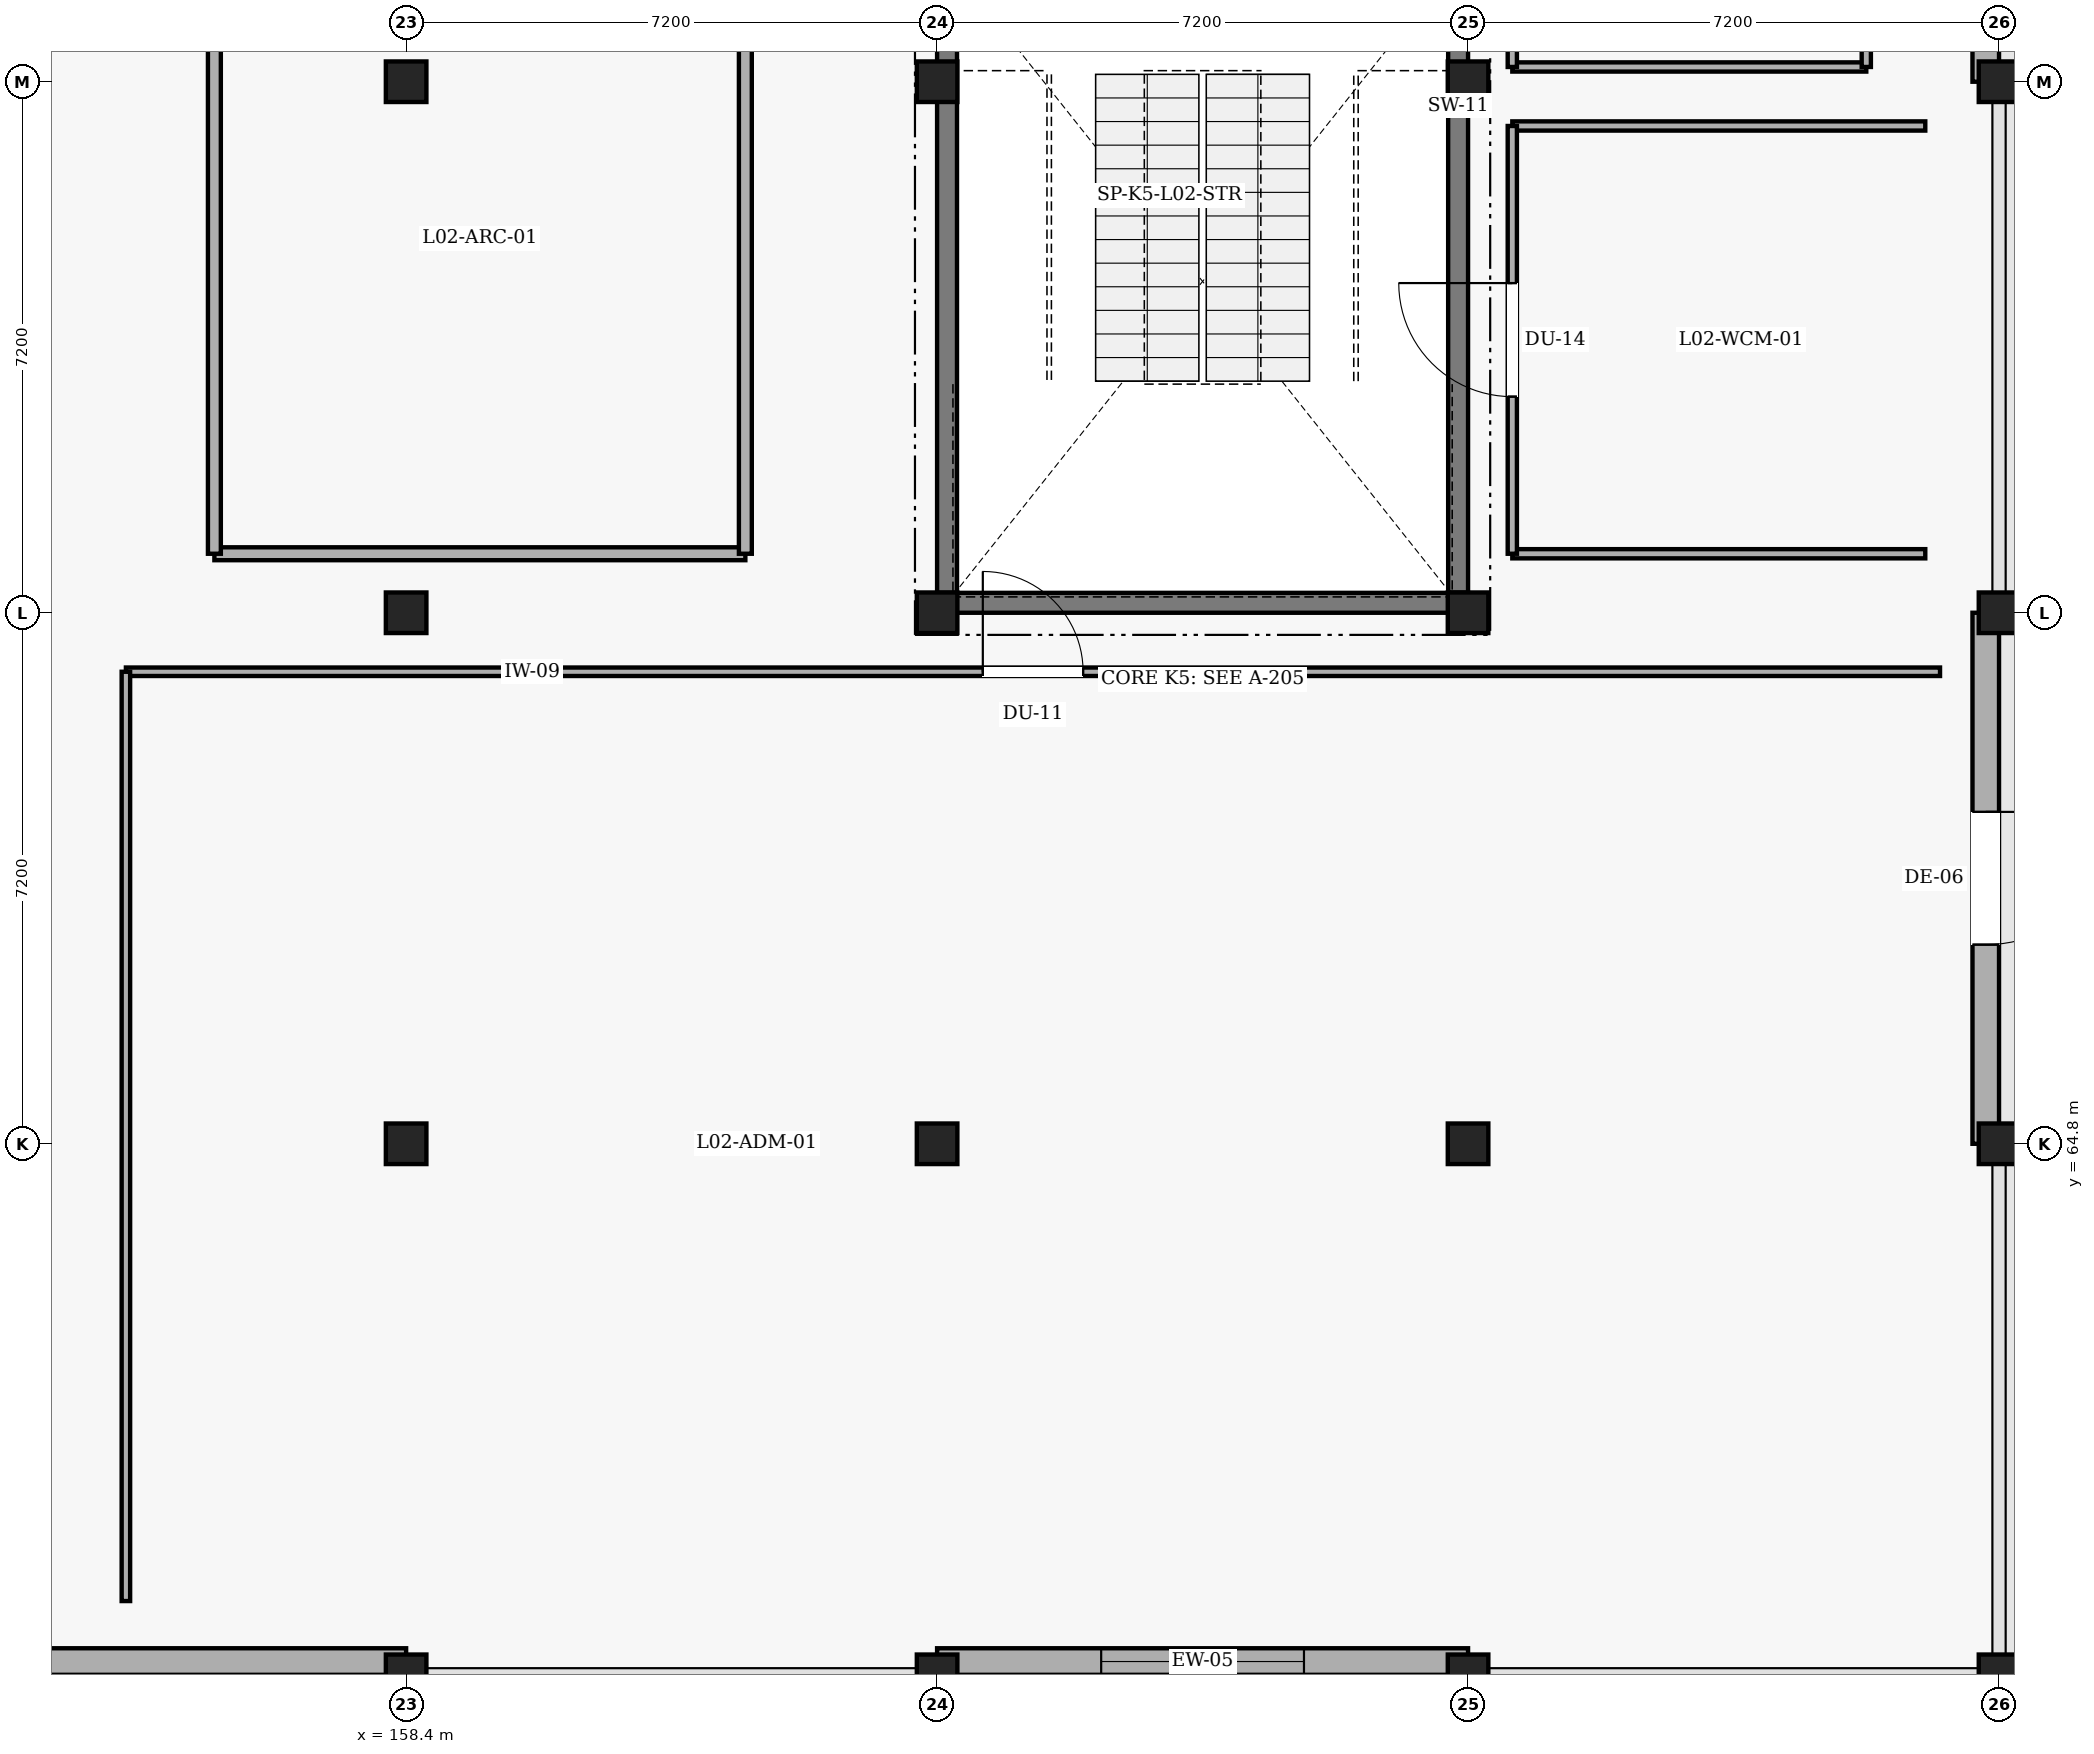
"""IFC4 building model, lengths in metres.
Left out: names, types, materials, properties, quantities, classifications, styles, units other than length and angle.
Written with IfcOpenShell. Run it as: python <this file> out.ifc"""

import sys

from ifc_helpers import new_model, si_unit, direction, frame, frame_2d, origin, origin_2d, place, context, subcontext, project, spatial, rectangle, extrude, element, fill, save


model = new_model("IFC4")
c1 = context("Model", 3, precision=1e-05, world=origin(), true_north=direction((0.0, 1.0)))
c2 = subcontext(c1, "Body", "Model", "MODEL_VIEW")
j1 = project(units=[si_unit("LENGTHUNIT", "METRE"), si_unit("PLANEANGLEUNIT", "RADIAN")], contexts=[c1])
p1 = place(None, origin())
s1 = spatial("IfcSite", under=j1, at=p1, CompositionType="ELEMENT")
p2 = place(p1, origin())
s2 = spatial("IfcBuilding", under=s1, at=p2, CompositionType="ELEMENT")
p3 = place(p2, frame((0.0, 0.0, 9.6)))
s3 = spatial("IfcBuildingStorey", under=s2, at=p3, CompositionType="ELEMENT", Elevation=9.6)
p4 = place(p3, frame((172.665, 86.13, 0.0), z_axis=(0.0, 0.0, 1.0), x_axis=(0.0, -1.0, 0.0)))
e1 = element("IfcWall", 1, at=p4, inside=s3, PredefinedType="SHEAR", context=c2, shape_type="SweptSolid", body=[
    extrude(rectangle(XDim=13.86, YDim=0.27, at=frame_2d((6.93, 0.0))), origin(), (0.0, 0.0, 1.0), 4.2),
])
p5 = place(p3, frame((172.8, 72.135, 0.0), z_axis=(0.0, 0.0, 1.0), x_axis=(-1.0, 0.0, 0.0)))
e2 = element("IfcWall", 2, at=p5, inside=s3, PredefinedType="SHEAR", context=c2, shape_type="SweptSolid", body=[
    extrude(rectangle(XDim=7.2, YDim=0.27, at=frame_2d((3.6, 0.0))), origin(), (0.0, 0.0, 1.0), 4.2),
])
p6 = place(p3, frame((165.735, 72.27, 0.0), z_axis=(0.0, 0.0, 1.0), x_axis=(0.0, 1.0, 0.0)))
e3 = element("IfcWall", 3, at=p6, inside=s3, PredefinedType="SHEAR", context=c2, shape_type="SweptSolid", body=[
    extrude(rectangle(XDim=13.86, YDim=0.27, at=frame_2d((6.93, 0.0))), origin(), (0.0, 0.0, 1.0), 4.2),
])
p7 = place(p6, frame((9.8, 0.0, 0.0)))
e4 = element("IfcOpeningElement", 4, at=p7, cuts=e3, PredefinedType="OPENING", context=c2, shape_type="SweptSolid", body=[
    extrude(rectangle(XDim=1.25, YDim=2.2, at=frame_2d((0.625, 1.1))), frame((0.0, 0.145, 0.0), z_axis=(0.0, -1.0, 0.0), x_axis=(1.0, 0.0, 0.0)), (0.0, 0.0, 1.0), 0.29),
])
for number, where, z_axis, x_axis in (
    (5, (158.4, 57.6, 0.0), (0.0, 0.0, 1.0), (1.0, 0.0, 0.0)),
    (6, (158.4, 64.8, 0.0), (0.0, 0.0, 1.0), (1.0, 0.0, 0.0)),
    (7, (158.4, 72.0, 0.0), (0.0, 0.0, 1.0), (1.0, 0.0, 0.0)),
    (8, (158.4, 79.2, 0.0), (0.0, 0.0, 1.0), (1.0, 0.0, 0.0)),
    (9, (165.6, 57.6, 0.0), (0.0, 0.0, 1.0), (1.0, 0.0, 0.0)),
    (10, (165.6, 64.8, 0.0), (0.0, 0.0, 1.0), (1.0, 0.0, 0.0)),
    (11, (165.6, 72.0, 0.0), (0.0, 0.0, 1.0), (1.0, 0.0, 0.0)),
    (12, (165.6, 79.2, 0.0), (0.0, 0.0, 1.0), (1.0, 0.0, 0.0)),
    (13, (172.8, 57.6, 0.0), (0.0, 0.0, 1.0), (1.0, 0.0, 0.0)),
    (14, (172.8, 64.8, 0.0), (0.0, 0.0, 1.0), (1.0, 0.0, 0.0)),
    (15, (172.8, 72.0, 0.0), (0.0, 0.0, 1.0), (1.0, 0.0, 0.0)),
    (16, (172.8, 79.2, 0.0), (0.0, 0.0, 1.0), (1.0, 0.0, 0.0)),
    (17, (180.0, 57.6, 0.0), (0.0, 0.0, 1.0), (1.0, 0.0, 0.0)),
    (18, (180.0, 64.8, 0.0), (0.0, 0.0, 1.0), (1.0, 0.0, 0.0)),
    (19, (180.0, 72.0, 0.0), (0.0, 0.0, 1.0), (1.0, 0.0, 0.0)),
    (20, (180.0, 79.2, 0.0), (0.0, 0.0, 1.0), (1.0, 0.0, 0.0)),
):
    element("IfcColumn", number, at=place(p3, frame(where, z_axis=z_axis, x_axis=x_axis)), inside=s3, PredefinedType="COLUMN", context=c2, shape_type="SweptSolid", body=[
        extrude(rectangle(XDim=0.55, YDim=0.55, at=origin_2d()), origin(), (0.0, 0.0, 1.0), 3.92),
    ])
p8 = place(p3, frame((179.82, 86.4, 0.0), z_axis=(0.0, 0.0, 1.0), x_axis=(0.0, -1.0, 0.0)))
e21 = element("IfcWall", 21, at=p8, inside=s3, PredefinedType="SOLIDWALL", context=c2, shape_type="SweptSolid", body=[
    extrude(rectangle(XDim=7.2, YDim=0.36, at=frame_2d((3.6, 0.0))), origin(), (0.0, 0.0, 1.0), 3.62),
])
p9 = place(p8, frame((2.275, 0.0, 0.9)))
e22 = element("IfcOpeningElement", 22, at=p9, cuts=e21, PredefinedType="OPENING", context=c2, shape_type="SweptSolid", body=[
    extrude(rectangle(XDim=2.65, YDim=1.7, at=frame_2d((1.325, 0.85))), frame((0.0, 0.19, 0.0), z_axis=(0.0, -1.0, 0.0), x_axis=(1.0, 0.0, 0.0)), (0.0, 0.0, 1.0), 0.38),
])
p10 = place(p3, frame((179.82, 72.0, 0.0), z_axis=(0.0, 0.0, 1.0), x_axis=(0.0, -1.0, 0.0)))
e23 = element("IfcWall", 23, at=p10, inside=s3, PredefinedType="SOLIDWALL", context=c2, shape_type="SweptSolid", body=[
    extrude(rectangle(XDim=7.2, YDim=0.36, at=frame_2d((3.6, 0.0))), origin(), (0.0, 0.0, 1.0), 3.62),
])
p11 = place(p10, frame((2.7, 0.0, 0.0)))
e24 = element("IfcOpeningElement", 24, at=p11, cuts=e23, PredefinedType="OPENING", context=c2, shape_type="SweptSolid", body=[
    extrude(rectangle(XDim=1.8, YDim=2.25, at=frame_2d((0.9, 1.125))), frame((0.0, 0.19, 0.0), z_axis=(0.0, -1.0, 0.0), x_axis=(1.0, 0.0, 0.0)), (0.0, 0.0, 1.0), 0.38),
])
p12 = place(p3, frame((172.8, 57.78, 0.0), z_axis=(0.0, 0.0, 1.0), x_axis=(-1.0, 0.0, 0.0)))
e25 = element("IfcWall", 25, at=p12, inside=s3, PredefinedType="SOLIDWALL", context=c2, shape_type="SweptSolid", body=[
    extrude(rectangle(XDim=7.2, YDim=0.36, at=frame_2d((3.6, 0.0))), origin(), (0.0, 0.0, 1.0), 3.62),
])
p13 = place(p12, frame((2.225, 0.0, 0.9)))
e26 = element("IfcOpeningElement", 26, at=p13, cuts=e25, PredefinedType="OPENING", context=c2, shape_type="SweptSolid", body=[
    extrude(rectangle(XDim=2.75, YDim=1.75, at=frame_2d((1.375, 0.875))), frame((0.0, 0.19, 0.0), z_axis=(0.0, -1.0, 0.0), x_axis=(1.0, 0.0, 0.0)), (0.0, 0.0, 1.0), 0.38),
])
p14 = place(p3, frame((158.4, 57.78, 0.0), z_axis=(0.0, 0.0, 1.0), x_axis=(-1.0, 0.0, 0.0)))
e27 = element("IfcWall", 27, at=p14, inside=s3, PredefinedType="SOLIDWALL", context=c2, shape_type="SweptSolid", body=[
    extrude(rectangle(XDim=7.2, YDim=0.36, at=frame_2d((3.6, 0.0))), origin(), (0.0, 0.0, 1.0), 3.62),
])
p15 = place(p3, frame((180.12, 57.6, 0.0), z_axis=(0.0, 0.0, 1.0), x_axis=(1.0, 0.0, 0.0)))
e28 = element("IfcWall", 28, at=p15, inside=s3, PredefinedType="PARAPET", context=c2, shape_type="SweptSolid", body=[
    extrude(rectangle(XDim=7.08, YDim=0.21, at=frame_2d((3.54, 0.0))), origin(), (0.0, 0.0, 1.0), 1.12),
])
p16 = place(p3, frame((154.6, 71.2, 0.0), z_axis=(0.0, 0.0, 1.0), x_axis=(1.0, 0.0, 0.0)))
e29 = element("IfcWall", 29, at=p16, inside=s3, PredefinedType="PARTITIONING", context=c2, shape_type="SweptSolid", body=[
    extrude(rectangle(XDim=24.6, YDim=0.115, at=frame_2d((12.3, 0.0))), origin(), (0.0, 0.0, 1.0), 3.52),
])
p17 = place(p16, frame((11.62, 0.0, 0.0)))
e30 = element("IfcOpeningElement", 30, at=p17, cuts=e29, PredefinedType="OPENING", context=c2, shape_type="SweptSolid", body=[
    extrude(rectangle(XDim=1.36, YDim=2.18, at=frame_2d((0.68, 1.09))), frame((0.0, 0.067, 0.0), z_axis=(0.0, -1.0, 0.0), x_axis=(1.0, 0.0, 0.0)), (0.0, 0.0, 1.0), 0.135),
])
p18 = place(p3, frame((154.6, 58.6, 0.0), z_axis=(0.0, 0.0, 1.0), x_axis=(0.0, 1.0, 0.0)))
e31 = element("IfcWall", 31, at=p18, inside=s3, PredefinedType="PARTITIONING", context=c2, shape_type="SweptSolid", body=[
    extrude(rectangle(XDim=12.6, YDim=0.115, at=frame_2d((6.3, 0.0))), origin(), (0.0, 0.0, 1.0), 3.47),
])
p19 = place(p3, frame((163.0, 72.8, 0.0), z_axis=(0.0, 0.0, 1.0), x_axis=(-1.0, 0.0, 0.0)))
e32 = element("IfcWall", 32, at=p19, inside=s3, PredefinedType="PARTITIONING", context=c2, shape_type="SweptSolid", body=[
    extrude(rectangle(XDim=7.2, YDim=0.175, at=frame_2d((3.6, 0.0))), origin(), (0.0, 0.0, 1.0), 3.52),
])
p20 = place(p3, frame((163.0, 92.6, 0.0), z_axis=(0.0, 0.0, 1.0), x_axis=(0.0, -1.0, 0.0)))
e33 = element("IfcWall", 33, at=p20, inside=s3, PredefinedType="PARTITIONING", context=c2, shape_type="SweptSolid", body=[
    extrude(rectangle(XDim=19.8, YDim=0.175, at=frame_2d((9.9, 0.0))), origin(), (0.0, 0.0, 1.0), 3.47),
])
p21 = place(p3, frame((155.8, 72.8, 0.0), z_axis=(0.0, 0.0, 1.0), x_axis=(0.0, 1.0, 0.0)))
e34 = element("IfcWall", 34, at=p21, inside=s3, PredefinedType="PARTITIONING", context=c2, shape_type="SweptSolid", body=[
    extrude(rectangle(XDim=19.8, YDim=0.175, at=frame_2d((9.9, 0.0))), origin(), (0.0, 0.0, 1.0), 3.47),
])
p22 = place(p21, frame((9.16, 0.0, 0.0)))
e35 = element("IfcOpeningElement", 35, at=p22, cuts=e34, PredefinedType="OPENING", context=c2, shape_type="SweptSolid", body=[
    extrude(rectangle(XDim=1.48, YDim=2.18, at=frame_2d((0.74, 1.09))), frame((0.0, 0.097, 0.0), z_axis=(0.0, -1.0, 0.0), x_axis=(1.0, 0.0, 0.0)), (0.0, 0.0, 1.0), 0.195),
])
for number, where, z_axis, x_axis in (
    (36, (173.4, 78.6, 0.0), (0.0, 0.0, 1.0), (1.0, 0.0, 0.0)),
    (37, (179.0, 72.8, 0.0), (0.0, 0.0, 1.0), (-1.0, 0.0, 0.0)),
):
    element("IfcWall", number, at=place(p3, frame(where, z_axis=z_axis, x_axis=x_axis)), inside=s3, PredefinedType="PARTITIONING", context=c2, shape_type="SweptSolid", body=[
        extrude(rectangle(XDim=5.6, YDim=0.125, at=frame_2d((2.8, 0.0))), origin(), (0.0, 0.0, 1.0), 3.85),
    ])
p23 = place(p3, frame((173.4, 72.8, 0.0), z_axis=(0.0, 0.0, 1.0), x_axis=(0.0, 1.0, 0.0)))
e38 = element("IfcWall", 38, at=p23, inside=s3, PredefinedType="PARTITIONING", context=c2, shape_type="SweptSolid", body=[
    extrude(rectangle(XDim=5.8, YDim=0.125, at=frame_2d((2.9, 0.0))), origin(), (0.0, 0.0, 1.0), 3.65),
])
p24 = place(p23, frame((2.13, 0.0, 0.0)))
e39 = element("IfcOpeningElement", 39, at=p24, cuts=e38, PredefinedType="OPENING", context=c2, shape_type="SweptSolid", body=[
    extrude(rectangle(XDim=1.54, YDim=2.22, at=frame_2d((0.77, 1.11))), frame((0.0, 0.073, 0.0), z_axis=(0.0, -1.0, 0.0), x_axis=(1.0, 0.0, 0.0)), (0.0, 0.0, 1.0), 0.145),
])
p25 = place(p3, frame((178.2, 79.4, 0.0), z_axis=(0.0, 0.0, 1.0), x_axis=(-1.0, 0.0, 0.0)))
e40 = element("IfcWall", 40, at=p25, inside=s3, PredefinedType="PARTITIONING", context=c2, shape_type="SweptSolid", body=[
    extrude(rectangle(XDim=4.8, YDim=0.125, at=frame_2d((2.4, 0.0))), origin(), (0.0, 0.0, 1.0), 3.47),
])
p26 = place(p3, frame((178.2, 84.2, 0.0), z_axis=(0.0, 0.0, 1.0), x_axis=(0.0, -1.0, 0.0)))
e41 = element("IfcWall", 41, at=p26, inside=s3, PredefinedType="PARTITIONING", context=c2, shape_type="SweptSolid", body=[
    extrude(rectangle(XDim=4.8, YDim=0.125, at=frame_2d((2.4, 0.0))), origin(), (0.0, 0.0, 1.0), 3.65),
])
p27 = place(p3, frame((173.4, 79.4, 0.0), z_axis=(0.0, 0.0, 1.0), x_axis=(0.0, 1.0, 0.0)))
e42 = element("IfcWall", 42, at=p27, inside=s3, PredefinedType="PARTITIONING", context=c2, shape_type="SweptSolid", body=[
    extrude(rectangle(XDim=4.8, YDim=0.125, at=frame_2d((2.4, 0.0))), origin(), (0.0, 0.0, 1.0), 3.65),
])
p28 = place(p27, frame((1.875, 0.0, 0.0)))
e43 = element("IfcOpeningElement", 43, at=p28, cuts=e42, PredefinedType="OPENING", context=c2, shape_type="SweptSolid", body=[
    extrude(rectangle(XDim=1.05, YDim=2.1, at=frame_2d((0.525, 1.05))), frame((0.0, 0.073, 0.0), z_axis=(0.0, -1.0, 0.0), x_axis=(1.0, 0.0, 0.0)), (0.0, 0.0, 1.0), 0.145),
])
p29 = place(p11, origin())
e44 = element("IfcDoor", 44, at=p29, inside=s3, OperationType="SINGLE_SWING_LEFT", PredefinedType="DOOR", context=c2, shape_type="SweptSolid", body=[
    extrude(rectangle(XDim=1.8, YDim=2.25, at=frame_2d((0.9, 1.125))), frame((0.0, 0.025, 0.0), z_axis=(0.0, -1.0, 0.0), x_axis=(1.0, 0.0, 0.0)), (0.0, 0.0, 1.0), 0.05),
])
fill(e24, e44)
p30 = place(p13, origin())
e45 = element("IfcWindow", 45, at=p30, inside=s3, PartitioningType="SINGLE_PANEL", PredefinedType="WINDOW", context=c2, shape_type="SweptSolid", body=[
    extrude(rectangle(XDim=2.75, YDim=1.75, at=frame_2d((1.375, 0.875))), frame((0.0, 0.03, 0.0), z_axis=(0.0, -1.0, 0.0), x_axis=(1.0, 0.0, 0.0)), (0.0, 0.0, 1.0), 0.06),
])
fill(e26, e45)
p31 = place(p17, origin())
e46 = element("IfcDoor", 46, at=p31, inside=s3, OperationType="SINGLE_SWING_LEFT", PredefinedType="DOOR", context=c2, shape_type="SweptSolid", body=[
    extrude(rectangle(XDim=1.36, YDim=2.18, at=frame_2d((0.68, 1.09))), frame((0.0, 0.025, 0.0), z_axis=(0.0, -1.0, 0.0), x_axis=(1.0, 0.0, 0.0)), (0.0, 0.0, 1.0), 0.05),
])
fill(e30, e46)
p32 = place(p24, origin())
e47 = element("IfcDoor", 47, at=p32, inside=s3, OperationType="SINGLE_SWING_RIGHT", PredefinedType="DOOR", context=c2, shape_type="SweptSolid", body=[
    extrude(rectangle(XDim=1.54, YDim=2.22, at=frame_2d((0.77, 1.11))), frame((0.0, 0.025, 0.0), z_axis=(0.0, -1.0, 0.0), x_axis=(1.0, 0.0, 0.0)), (0.0, 0.0, 1.0), 0.05),
])
fill(e39, e47)
save(model, sys.argv[1])
